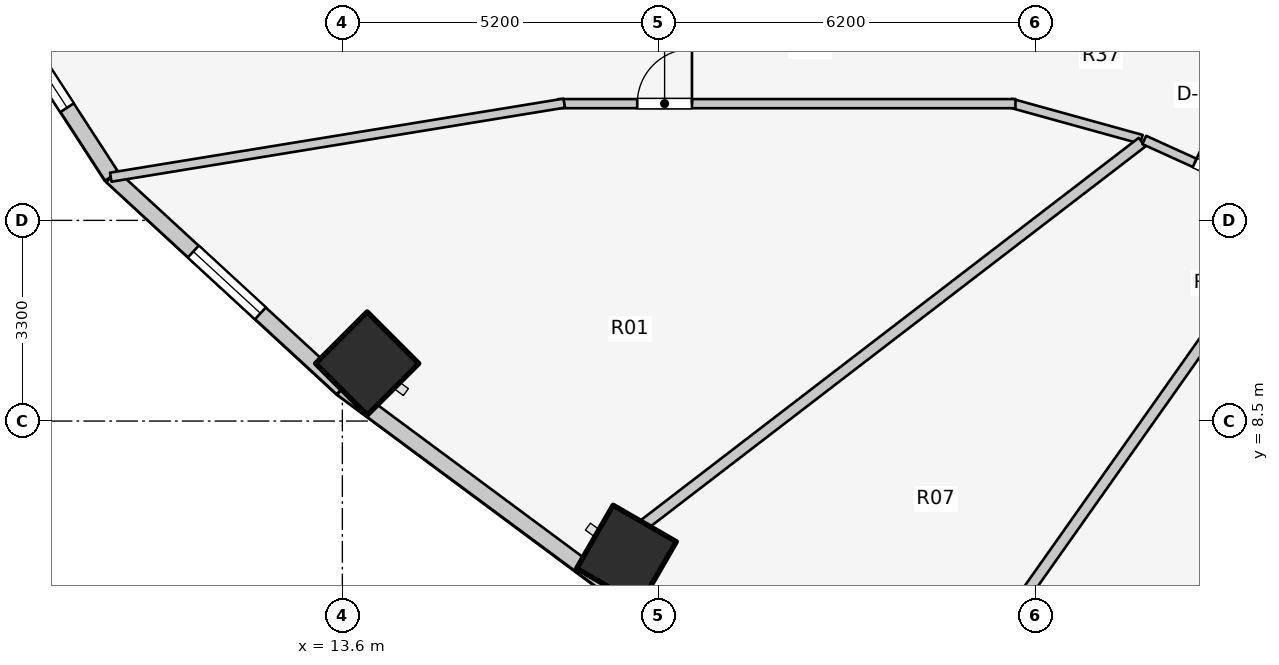
"""IFC4 building model, lengths in metres.
Left out: names, types, materials, properties, quantities, classifications, styles, units other than length and angle.
Written with IfcOpenShell. Run it as: python <this file> out.ifc"""

import sys

from ifc_helpers import new_model, si_unit, direction, frame, frame_2d, origin, origin_2d, place, context, subcontext, project, spatial, rectangle, extrude, element, fill, save


model = new_model("IFC4")
c1 = context("Model", 3, precision=1e-05, world=origin(), true_north=direction((0.0, 1.0)))
c2 = subcontext(c1, "Body", "Model", "MODEL_VIEW")
j1 = project(units=[si_unit("LENGTHUNIT", "METRE"), si_unit("PLANEANGLEUNIT", "RADIAN")], contexts=[c1])
p1 = place(None, origin())
s1 = spatial("IfcSite", under=j1, at=p1, CompositionType="ELEMENT")
p2 = place(p1, origin())
s2 = spatial("IfcBuilding", under=s1, at=p2, CompositionType="ELEMENT")
p3 = place(p2, frame((0.0, 0.0, 58.6)))
s3 = spatial("IfcBuildingStorey", under=s2, at=p3, CompositionType="ELEMENT", Elevation=58.6)
for number, where, z_axis, x_axis in (
    (1, (14.008, 9.446, 0.0), (0.0, 0.0, 1.0), (-0.707, -0.707, 0.0)),
    (2, (18.273, 6.296, 0.0), (0.0, 0.0, 1.0), (-0.5, -0.866, 0.0)),
):
    element("IfcColumn", number, at=place(p3, frame(where, z_axis=z_axis, x_axis=x_axis)), inside=s3, PredefinedType="COLUMN", context=c2, shape_type="SweptSolid", body=[
        extrude(rectangle(XDim=1.2, YDim=1.2, at=origin_2d()), origin(), (0.0, 0.0, 1.0), 3.1),
    ])
p4 = place(p3, frame((7.033, 16.795, 0.0), z_axis=(0.0, 0.0, 1.0), x_axis=(0.544578722263, -0.838709732421, 0.0)))
e3 = element("IfcWall", 3, at=p4, inside=s3, PredefinedType="STANDARD", context=c2, shape_type="SweptSolid", body=[
    extrude(rectangle(XDim=5.092, YDim=0.26, at=frame_2d((2.546, 0.0))), origin(), (0.0, 0.0, 1.0), 2.85),
])
p5 = place(p4, frame((1.346, 0.0, 0.75)))
e4 = element("IfcOpeningElement", 4, at=p5, cuts=e3, PredefinedType="OPENING", context=c2, shape_type="SweptSolid", body=[
    extrude(rectangle(XDim=2.4, YDim=1.7, at=frame_2d((1.2, 0.85))), frame((0.0, 0.14, 0.0), z_axis=(0.0, -1.0, 0.0), x_axis=(1.0, 0.0, 0.0)), (0.0, 0.0, 1.0), 0.28),
])
p6 = place(p3, frame((9.806, 12.524, 0.0), z_axis=(0.0, 0.0, 1.0), x_axis=(0.735655109293, -0.67735630223, 0.0)))
e5 = element("IfcWall", 5, at=p6, inside=s3, PredefinedType="STANDARD", context=c2, shape_type="SweptSolid", body=[
    extrude(rectangle(XDim=5.151, YDim=0.26, at=frame_2d((2.575, 0.0))), origin(), (0.0, 0.0, 1.0), 2.85),
])
p7 = place(p6, frame((1.825, 0.0, 0.75)))
e6 = element("IfcOpeningElement", 6, at=p7, cuts=e5, PredefinedType="OPENING", context=c2, shape_type="SweptSolid", body=[
    extrude(rectangle(XDim=1.5, YDim=1.6, at=frame_2d((0.75, 0.8))), frame((0.0, 0.14, 0.0), z_axis=(0.0, -1.0, 0.0), x_axis=(1.0, 0.0, 0.0)), (0.0, 0.0, 1.0), 0.28),
])
p8 = place(p3, frame((13.595, 9.035, 0.0), z_axis=(0.0, 0.0, 1.0), x_axis=(0.803477531792, -0.595335078679, 0.0)))
e7 = element("IfcWall", 7, at=p8, inside=s3, PredefinedType="STANDARD", context=c2, shape_type="SweptSolid", body=[
    extrude(rectangle(XDim=5.43, YDim=0.26, at=frame_2d((2.715, 0.0))), origin(), (0.0, 0.0, 1.0), 2.85),
])
p9 = place(p3, frame((17.958, 5.803, 0.0), z_axis=(0.0, 0.0, 1.0), x_axis=(0.919612132394, -0.39282760335, 0.0)))
e8 = element("IfcWall", 8, at=p9, inside=s3, PredefinedType="STANDARD", context=c2, shape_type="SweptSolid", body=[
    extrude(rectangle(XDim=6.209, YDim=0.26, at=frame_2d((3.105, 0.0))), origin(), (0.0, 0.0, 1.0), 2.85),
])
p10 = place(p9, frame((1.905, 0.0, 0.75)))
e9 = element("IfcOpeningElement", 9, at=p10, cuts=e8, PredefinedType="OPENING", context=c2, shape_type="SweptSolid", body=[
    extrude(rectangle(XDim=2.4, YDim=1.7, at=frame_2d((1.2, 0.85))), frame((0.0, 0.14, 0.0), z_axis=(0.0, -1.0, 0.0), x_axis=(1.0, 0.0, 0.0)), (0.0, 0.0, 1.0), 0.28),
])
p11 = place(p3, frame((26.742, 13.133, 0.0), z_axis=(0.0, 0.0, 1.0), x_axis=(-0.963833843713, 0.266503886865, 0.0)))
e10 = element("IfcWall", 10, at=p11, inside=s3, PredefinedType="PARTITIONING", context=c2, shape_type="SweptSolid", body=[
    extrude(rectangle(XDim=2.232, YDim=0.15, at=frame_2d((1.116, 0.0))), origin(), (0.0, 0.0, 1.0), 2.237),
])
p12 = place(p3, frame((17.15, 13.72, 0.0), z_axis=(0.0, 0.0, 1.0), x_axis=(1.0, 0.0, 0.0)))
e11 = element("IfcWall", 11, at=p12, inside=s3, PredefinedType="PARTITIONING", context=c2, shape_type="SweptSolid", body=[
    extrude(rectangle(XDim=7.52, YDim=0.15, at=frame_2d((3.76, 0.0))), origin(), (0.0, 0.0, 1.0), 2.237),
])
p13 = place(p12, frame((1.3, 0.0, 0.0)))
e12 = element("IfcOpeningElement", 12, at=p13, cuts=e11, PredefinedType="OPENING", context=c2, shape_type="SweptSolid", body=[
    extrude(rectangle(XDim=0.9, YDim=2.1, at=frame_2d((0.45, 1.05))), frame((0.0, 0.085, 0.0), z_axis=(0.0, -1.0, 0.0), x_axis=(1.0, 0.0, 0.0)), (0.0, 0.0, 1.0), 0.17),
])
p14 = place(p3, frame((17.249, 13.728, 0.0), z_axis=(0.0, 0.0, 1.0), x_axis=(-0.98693078372, -0.161144742846, 0.0)))
e13 = element("IfcWall", 13, at=p14, inside=s3, PredefinedType="PARTITIONING", context=c2, shape_type="SweptSolid", body=[
    extrude(rectangle(XDim=7.557, YDim=0.15, at=frame_2d((3.779, 0.0))), origin(), (0.0, 0.0, 1.0), 2.069),
])
p15 = place(p3, frame((26.751, 13.085, 0.0), z_axis=(0.0, 0.0, 1.0), x_axis=(-0.793181014702, -0.608985942298, 0.0)))
e14 = element("IfcWall", 14, at=p15, inside=s3, PredefinedType="PARTITIONING", context=c2, shape_type="SweptSolid", body=[
    extrude(rectangle(XDim=10.324, YDim=0.18, at=frame_2d((5.162, 0.0))), origin(), (0.0, 0.0, 1.0), 2.237),
])
p16 = place(p3, frame((29.274, 11.934, 0.0), z_axis=(0.0, 0.0, 1.0), x_axis=(-0.577036915124, -0.816718065543, 0.0)))
e15 = element("IfcWall", 15, at=p16, inside=s3, PredefinedType="PARTITIONING", context=c2, shape_type="SweptSolid", body=[
    extrude(rectangle(XDim=9.131, YDim=0.18, at=frame_2d((4.565, 0.0))), origin(), (0.0, 0.0, 1.0), 2.237),
])
p17 = place(p3, frame((26.789, 13.123, 0.0), z_axis=(0.0, 0.0, 1.0), x_axis=(0.910568469686, -0.41335827319, 0.0)))
e16 = element("IfcWall", 16, at=p17, inside=s3, PredefinedType="PARTITIONING", context=c2, shape_type="SweptSolid", body=[
    extrude(rectangle(XDim=2.772, YDim=0.15, at=frame_2d((1.386, 0.0))), origin(), (0.0, 0.0, 1.0), 2.237),
])
p18 = place(p17, frame((0.911, 0.0, 0.0)))
e17 = element("IfcOpeningElement", 17, at=p18, cuts=e16, PredefinedType="OPENING", context=c2, shape_type="SweptSolid", body=[
    extrude(rectangle(XDim=0.95, YDim=2.1, at=frame_2d((0.475, 1.05))), frame((0.0, 0.085, 0.0), z_axis=(0.0, -1.0, 0.0), x_axis=(1.0, 0.0, 0.0)), (0.0, 0.0, 1.0), 0.17),
])
p19 = place(p5, origin())
e18 = element("IfcWindow", 18, at=p19, inside=s3, PartitioningType="SINGLE_PANEL", PredefinedType="WINDOW", context=c2, shape_type="SweptSolid", body=[
    extrude(rectangle(XDim=2.4, YDim=1.7, at=frame_2d((1.2, 0.85))), frame((0.0, 0.03, 0.0), z_axis=(0.0, -1.0, 0.0), x_axis=(1.0, 0.0, 0.0)), (0.0, 0.0, 1.0), 0.06),
])
fill(e4, e18)
p20 = place(p7, origin())
e19 = element("IfcWindow", 19, at=p20, inside=s3, PartitioningType="SINGLE_PANEL", PredefinedType="WINDOW", context=c2, shape_type="SweptSolid", body=[
    extrude(rectangle(XDim=1.5, YDim=1.6, at=frame_2d((0.75, 0.8))), frame((0.0, 0.03, 0.0), z_axis=(0.0, -1.0, 0.0), x_axis=(1.0, 0.0, 0.0)), (0.0, 0.0, 1.0), 0.06),
])
fill(e6, e19)
p21 = place(p13, origin())
e20 = element("IfcDoor", 20, at=p21, inside=s3, OperationType="SINGLE_SWING_RIGHT", PredefinedType="DOOR", context=c2, shape_type="SweptSolid", body=[
    extrude(rectangle(XDim=0.9, YDim=2.1, at=frame_2d((0.45, 1.05))), frame((0.0, 0.025, 0.0), z_axis=(0.0, -1.0, 0.0), x_axis=(1.0, 0.0, 0.0)), (0.0, 0.0, 1.0), 0.05),
])
fill(e12, e20)
p22 = place(p18, origin())
e21 = element("IfcDoor", 21, at=p22, inside=s3, OperationType="SINGLE_SWING_LEFT", PredefinedType="DOOR", context=c2, shape_type="SweptSolid", body=[
    extrude(rectangle(XDim=0.95, YDim=2.1, at=frame_2d((0.475, 1.05))), frame((0.0, 0.025, 0.0), z_axis=(0.0, -1.0, 0.0), x_axis=(1.0, 0.0, 0.0)), (0.0, 0.0, 1.0), 0.05),
])
fill(e17, e21)
save(model, sys.argv[1])
